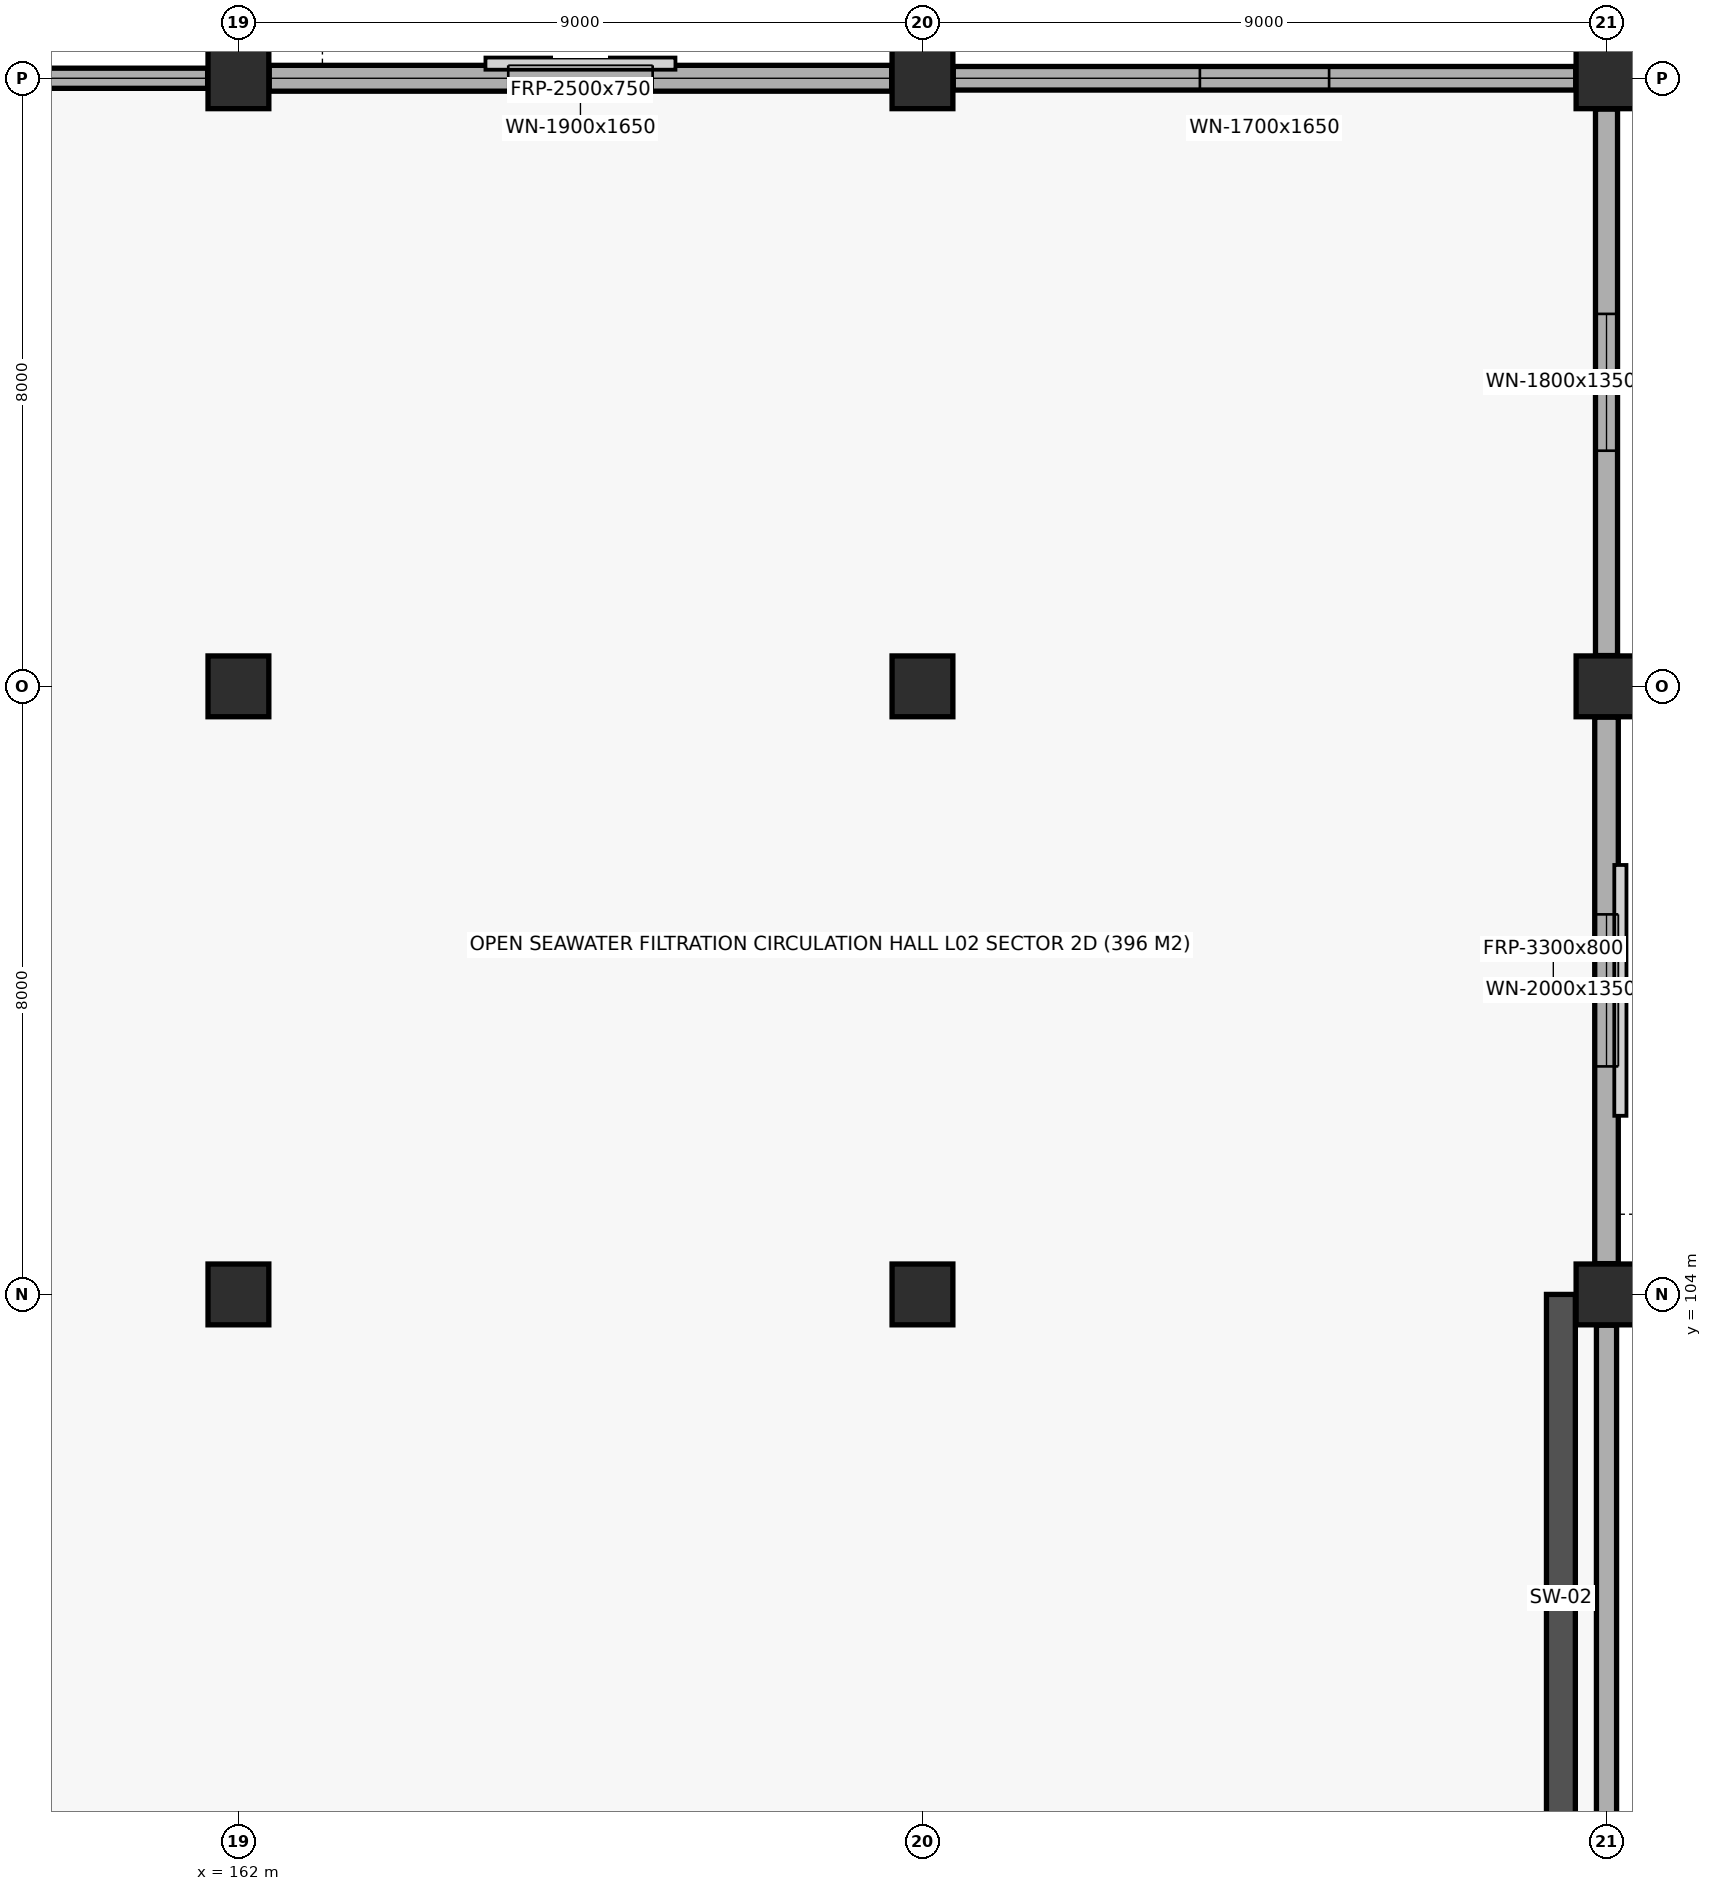
"""IFC4 building model, lengths in metres.
Left out: names, types, materials, properties, quantities, classifications, styles, units other than length and angle.
Written with IfcOpenShell. Run it as: python <this file> out.ifc"""

import sys

from ifc_helpers import new_model, si_unit, direction, frame, frame_2d, origin, origin_2d, place, context, subcontext, project, spatial, rectangle, extrude, element, fill, save


model = new_model("IFC4")
c1 = context("Model", 3, precision=1e-05, world=origin(), true_north=direction((0.0, 1.0)))
c2 = subcontext(c1, "Body", "Model", "MODEL_VIEW")
j1 = project(units=[si_unit("LENGTHUNIT", "METRE"), si_unit("PLANEANGLEUNIT", "RADIAN")], contexts=[c1])
p1 = place(None, origin())
s1 = spatial("IfcSite", under=j1, at=p1, CompositionType="ELEMENT")
p2 = place(p1, origin())
s2 = spatial("IfcBuilding", under=s1, at=p2, CompositionType="ELEMENT")
p3 = place(p2, frame((0.0, 0.0, 9.0)))
s3 = spatial("IfcBuildingStorey", under=s2, at=p3, CompositionType="ELEMENT", Elevation=9.0)
for number, where, z_axis, x_axis in (
    (1, (162.0, 104.0, 0.0), (0.0, 0.0, 1.0), (1.0, 0.0, 0.0)),
    (2, (162.0, 112.0, 0.0), (0.0, 0.0, 1.0), (1.0, 0.0, 0.0)),
    (3, (162.0, 120.0, 0.0), (0.0, 0.0, 1.0), (1.0, 0.0, 0.0)),
    (4, (171.0, 104.0, 0.0), (0.0, 0.0, 1.0), (1.0, 0.0, 0.0)),
    (5, (171.0, 112.0, 0.0), (0.0, 0.0, 1.0), (1.0, 0.0, 0.0)),
    (6, (171.0, 120.0, 0.0), (0.0, 0.0, 1.0), (1.0, 0.0, 0.0)),
    (7, (180.0, 104.0, 0.0), (0.0, 0.0, 1.0), (1.0, 0.0, 0.0)),
    (8, (180.0, 112.0, 0.0), (0.0, 0.0, 1.0), (1.0, 0.0, 0.0)),
    (9, (180.0, 120.0, 0.0), (0.0, 0.0, 1.0), (1.0, 0.0, 0.0)),
):
    element("IfcColumn", number, at=place(p3, frame(where, z_axis=z_axis, x_axis=x_axis)), inside=s3, PredefinedType="COLUMN", context=c2, shape_type="SweptSolid", body=[
        extrude(rectangle(XDim=0.8, YDim=0.8, at=origin_2d()), origin(), (0.0, 0.0, 1.0), 4.5),
    ])
p4 = place(p3, frame((179.4, 96.0, 0.0), z_axis=(0.0, 0.0, 1.0), x_axis=(0.0, 1.0, 0.0)))
e10 = element("IfcWall", 10, at=p4, inside=s3, PredefinedType="SHEAR", context=c2, shape_type="SweptSolid", body=[
    extrude(rectangle(XDim=8.0, YDim=0.38, at=frame_2d((4.0, 0.0))), origin(), (0.0, 0.0, 1.0), 4.14),
])
p5 = place(p3, frame((153.405, 120.0, 0.0), z_axis=(0.0, 0.0, 1.0), x_axis=(1.0, 0.0, 0.0)))
e11 = element("IfcWall", 11, at=p5, inside=s3, PredefinedType="STANDARD", context=c2, shape_type="SweptSolid", body=[
    extrude(rectangle(XDim=8.19, YDim=0.265, at=frame_2d((4.095, 0.0))), origin(), (0.0, 0.0, 1.0), 3.42),
])
p6 = place(p5, frame((3.045, 0.0, 0.85)))
e12 = element("IfcOpeningElement", 12, at=p6, cuts=e11, PredefinedType="OPENING", context=c2, shape_type="SweptSolid", body=[
    extrude(rectangle(XDim=2.1, YDim=1.65, at=frame_2d((1.05, 0.825))), frame((0.0, 0.145, 0.0), z_axis=(0.0, -1.0, 0.0), x_axis=(1.0, 0.0, 0.0)), (0.0, 0.0, 1.0), 0.289),
])
p7 = place(p3, frame((162.405, 120.0, 0.0), z_axis=(0.0, 0.0, 1.0), x_axis=(1.0, 0.0, 0.0)))
e13 = element("IfcWall", 13, at=p7, inside=s3, PredefinedType="STANDARD", context=c2, shape_type="SweptSolid", body=[
    extrude(rectangle(XDim=8.19, YDim=0.34, at=frame_2d((4.095, 0.0))), origin(), (0.0, 0.0, 1.0), 3.42),
])
p8 = place(p7, frame((3.145, 0.0, 0.85)))
e14 = element("IfcOpeningElement", 14, at=p8, cuts=e13, PredefinedType="OPENING", context=c2, shape_type="SweptSolid", body=[
    extrude(rectangle(XDim=1.9, YDim=1.65, at=frame_2d((0.95, 0.825))), frame((0.0, 0.182, 0.0), z_axis=(0.0, -1.0, 0.0), x_axis=(1.0, 0.0, 0.0)), (0.0, 0.0, 1.0), 0.364),
])
p9 = place(p3, frame((171.405, 120.0, 0.0), z_axis=(0.0, 0.0, 1.0), x_axis=(1.0, 0.0, 0.0)))
e15 = element("IfcWall", 15, at=p9, inside=s3, PredefinedType="STANDARD", context=c2, shape_type="SweptSolid", body=[
    extrude(rectangle(XDim=8.19, YDim=0.31, at=frame_2d((4.095, 0.0))), origin(), (0.0, 0.0, 1.0), 3.42),
])
p10 = place(p9, frame((3.245, 0.0, 0.85)))
e16 = element("IfcOpeningElement", 16, at=p10, cuts=e15, PredefinedType="OPENING", context=c2, shape_type="SweptSolid", body=[
    extrude(rectangle(XDim=1.7, YDim=1.65, at=frame_2d((0.85, 0.825))), frame((0.0, 0.167, 0.0), z_axis=(0.0, -1.0, 0.0), x_axis=(1.0, 0.0, 0.0)), (0.0, 0.0, 1.0), 0.334),
])
p11 = place(p3, frame((180.0, 96.405, 0.0), z_axis=(0.0, 0.0, 1.0), x_axis=(0.0, 1.0, 0.0)))
e17 = element("IfcWall", 17, at=p11, inside=s3, PredefinedType="STANDARD", context=c2, shape_type="SweptSolid", body=[
    extrude(rectangle(XDim=7.19, YDim=0.265, at=frame_2d((3.595, 0.0))), origin(), (0.0, 0.0, 1.0), 3.42),
])
p12 = place(p3, frame((180.0, 104.405, 0.0), z_axis=(0.0, 0.0, 1.0), x_axis=(0.0, 1.0, 0.0)))
e18 = element("IfcWall", 18, at=p12, inside=s3, PredefinedType="STANDARD", context=c2, shape_type="SweptSolid", body=[
    extrude(rectangle(XDim=7.19, YDim=0.31, at=frame_2d((3.595, 0.0))), origin(), (0.0, 0.0, 1.0), 3.42),
])
p13 = place(p12, frame((2.595, 0.0, 0.85)))
e19 = element("IfcOpeningElement", 19, at=p13, cuts=e18, PredefinedType="OPENING", context=c2, shape_type="SweptSolid", body=[
    extrude(rectangle(XDim=2.0, YDim=1.35, at=frame_2d((1.0, 0.675))), frame((0.0, 0.167, 0.0), z_axis=(0.0, -1.0, 0.0), x_axis=(1.0, 0.0, 0.0)), (0.0, 0.0, 1.0), 0.334),
])
p14 = place(p3, frame((180.0, 112.405, 0.0), z_axis=(0.0, 0.0, 1.0), x_axis=(0.0, 1.0, 0.0)))
e20 = element("IfcWall", 20, at=p14, inside=s3, PredefinedType="STANDARD", context=c2, shape_type="SweptSolid", body=[
    extrude(rectangle(XDim=7.19, YDim=0.29, at=frame_2d((3.595, 0.0))), origin(), (0.0, 0.0, 1.0), 3.42),
])
p15 = place(p14, frame((2.695, 0.0, 0.85)))
e21 = element("IfcOpeningElement", 21, at=p15, cuts=e20, PredefinedType="OPENING", context=c2, shape_type="SweptSolid", body=[
    extrude(rectangle(XDim=1.8, YDim=1.35, at=frame_2d((0.9, 0.675))), frame((0.0, 0.157, 0.0), z_axis=(0.0, -1.0, 0.0), x_axis=(1.0, 0.0, 0.0)), (0.0, 0.0, 1.0), 0.314),
])
p16 = place(p8, origin())
e22 = element("IfcWindow", 22, at=p16, inside=s3, PartitioningType="SINGLE_PANEL", PredefinedType="WINDOW", context=c2, shape_type="SweptSolid", body=[
    extrude(rectangle(XDim=1.9, YDim=1.65, at=frame_2d((0.95, 0.825))), frame((0.0, 0.03, 0.0), z_axis=(0.0, -1.0, 0.0), x_axis=(1.0, 0.0, 0.0)), (0.0, 0.0, 1.0), 0.06),
])
fill(e14, e22)
p17 = place(p10, origin())
e23 = element("IfcWindow", 23, at=p17, inside=s3, PartitioningType="SINGLE_PANEL", PredefinedType="WINDOW", context=c2, shape_type="SweptSolid", body=[
    extrude(rectangle(XDim=1.7, YDim=1.65, at=frame_2d((0.85, 0.825))), frame((0.0, 0.03, 0.0), z_axis=(0.0, -1.0, 0.0), x_axis=(1.0, 0.0, 0.0)), (0.0, 0.0, 1.0), 0.06),
])
fill(e16, e23)
p18 = place(p13, origin())
e24 = element("IfcWindow", 24, at=p18, inside=s3, PartitioningType="SINGLE_PANEL", PredefinedType="WINDOW", context=c2, shape_type="SweptSolid", body=[
    extrude(rectangle(XDim=2.0, YDim=1.35, at=frame_2d((1.0, 0.675))), frame((0.0, 0.03, 0.0), z_axis=(0.0, -1.0, 0.0), x_axis=(1.0, 0.0, 0.0)), (0.0, 0.0, 1.0), 0.06),
])
fill(e19, e24)
p19 = place(p15, origin())
e25 = element("IfcWindow", 25, at=p19, inside=s3, PartitioningType="SINGLE_PANEL", PredefinedType="WINDOW", context=c2, shape_type="SweptSolid", body=[
    extrude(rectangle(XDim=1.8, YDim=1.35, at=frame_2d((0.9, 0.675))), frame((0.0, 0.03, 0.0), z_axis=(0.0, -1.0, 0.0), x_axis=(1.0, 0.0, 0.0)), (0.0, 0.0, 1.0), 0.06),
])
fill(e21, e25)
save(model, sys.argv[1])
